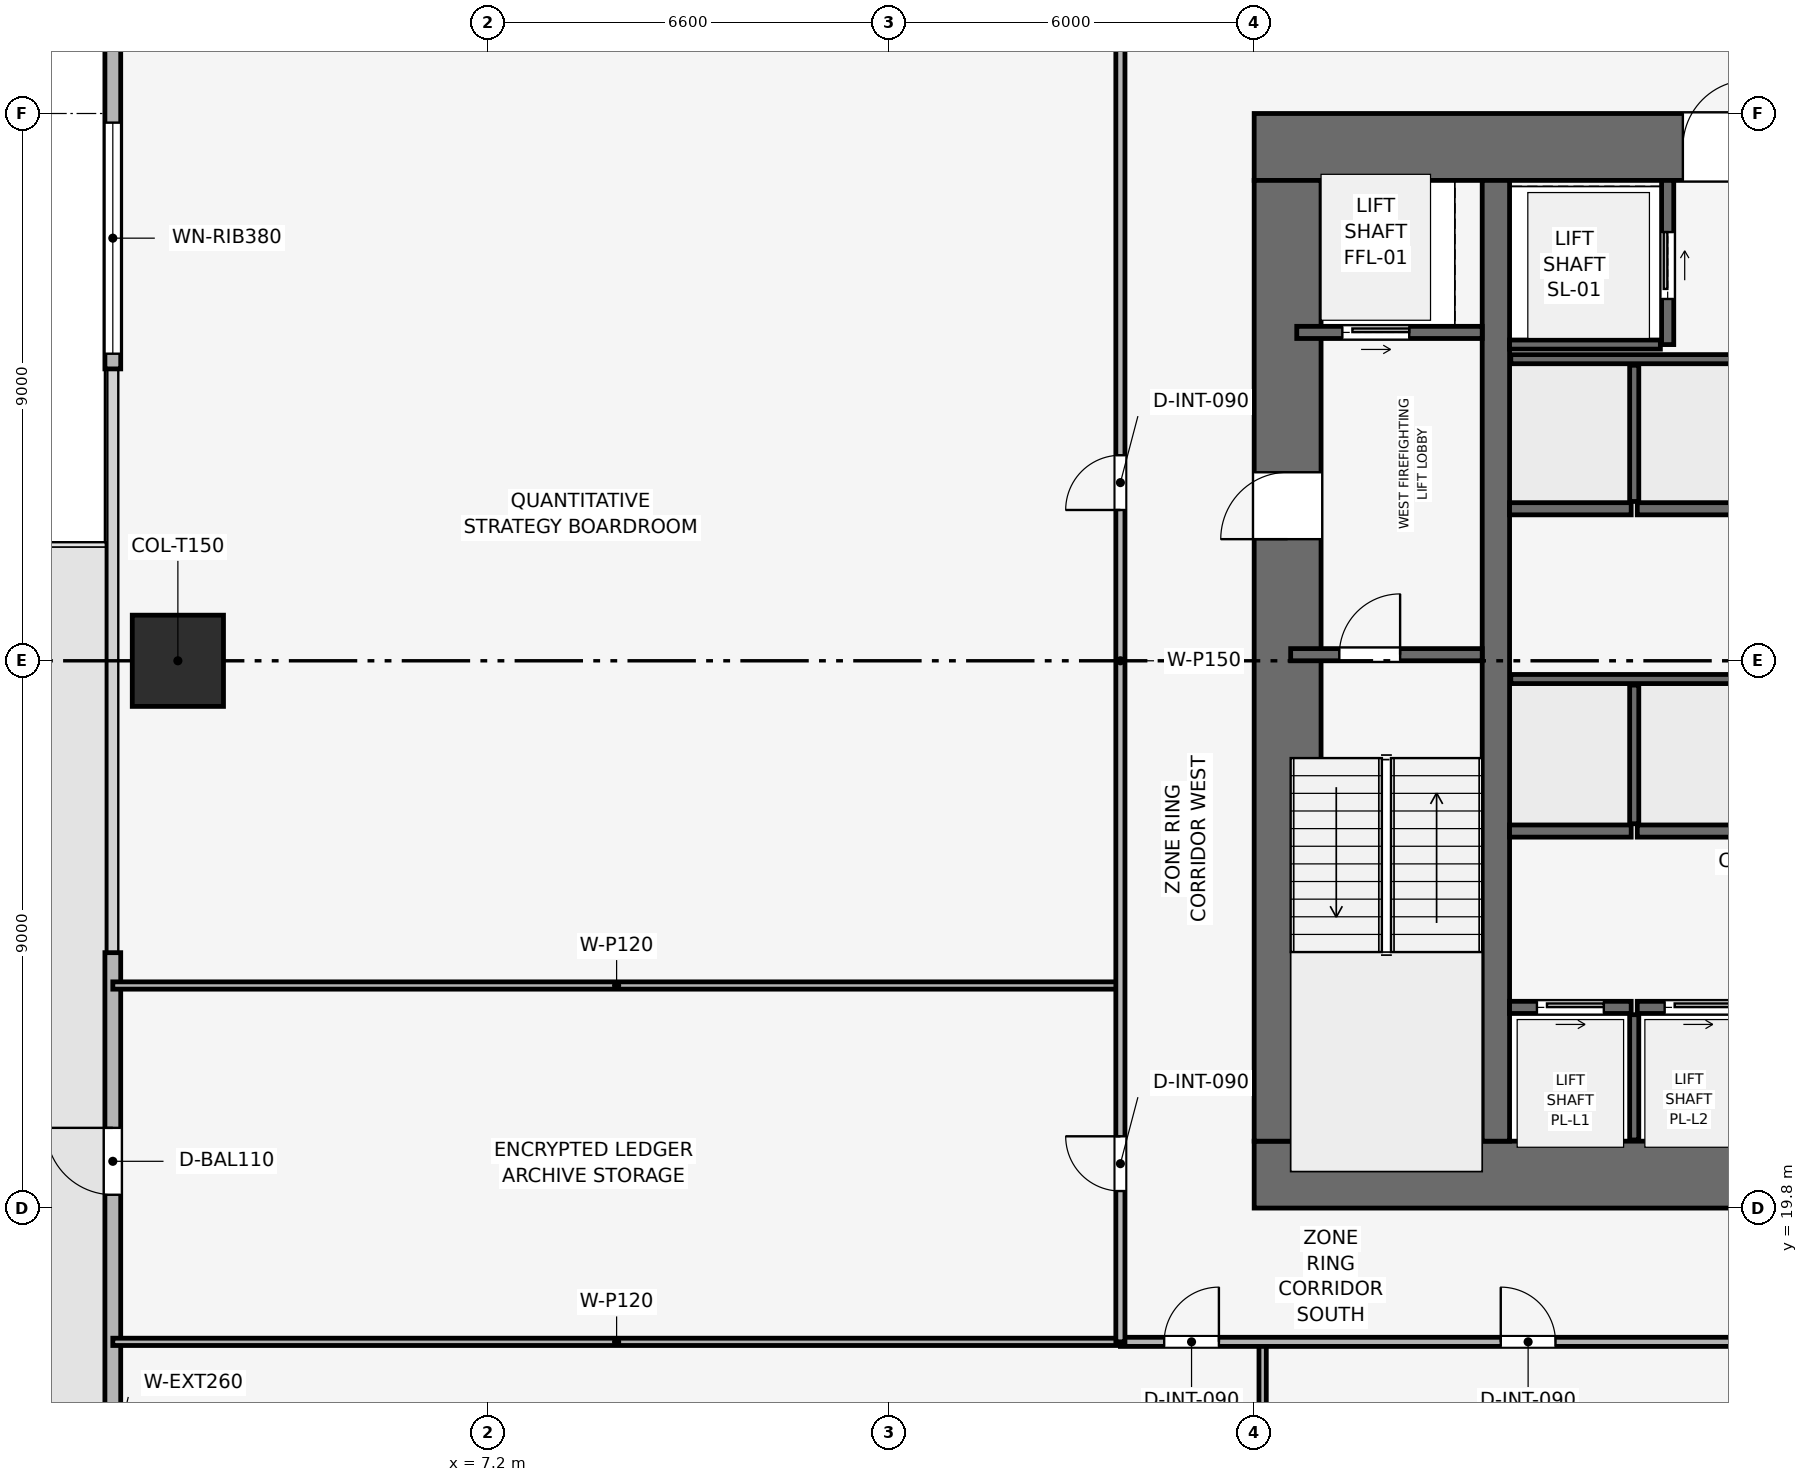
"""IFC4 building model, lengths in metres.
Left out: names, types, materials, properties, quantities, classifications, styles, units other than length and angle.
Written with IfcOpenShell. Run it as: python <this file> out.ifc"""

import sys

from ifc_helpers import new_model, si_unit, direction, frame, frame_2d, origin, origin_2d, place, context, subcontext, project, spatial, rectangle, extrude, element, fill, save


model = new_model("IFC4")
c1 = context("Model", 3, precision=1e-05, world=origin(), true_north=direction((0.0, 1.0)))
c2 = subcontext(c1, "Body", "Model", "MODEL_VIEW")
j1 = project(units=[si_unit("LENGTHUNIT", "METRE"), si_unit("PLANEANGLEUNIT", "RADIAN")], contexts=[c1])
p1 = place(None, origin())
s1 = spatial("IfcSite", under=j1, at=p1, CompositionType="ELEMENT")
p2 = place(p1, origin())
s2 = spatial("IfcBuilding", under=s1, at=p2, CompositionType="ELEMENT")
p3 = place(p2, frame((0.0, 0.0, 61.2)))
s3 = spatial("IfcBuildingStorey", under=s2, at=p3, CompositionType="ELEMENT", Elevation=61.2)
p4 = place(p3, frame((19.8, 20.35, 0.0), z_axis=(0.0, 0.0, 1.0), x_axis=(1.0, 0.0, 0.0)))
e1 = element("IfcWall", 1, at=p4, inside=s3, PredefinedType="SHEAR", context=c2, shape_type="SweptSolid", body=[
    extrude(rectangle(XDim=18.0, YDim=1.1, at=frame_2d((9.0, 0.0))), origin(), (0.0, 0.0, 1.0), 3.9),
])
p5 = place(p4, frame((8.4, 0.0, 0.0)))
e2 = element("IfcOpeningElement", 2, at=p5, cuts=e1, PredefinedType="OPENING", context=c2, shape_type="SweptSolid", body=[
    extrude(rectangle(XDim=1.2, YDim=2.2, at=frame_2d((0.6, 1.1))), frame((0.0, 0.56, 0.0), z_axis=(0.0, -1.0, 0.0), x_axis=(1.0, 0.0, 0.0)), (0.0, 0.0, 1.0), 1.12),
])
p6 = place(p3, frame((19.8, 37.25, 0.0), z_axis=(0.0, 0.0, 1.0), x_axis=(1.0, 0.0, 0.0)))
e3 = element("IfcWall", 3, at=p6, inside=s3, PredefinedType="SHEAR", context=c2, shape_type="SweptSolid", body=[
    extrude(rectangle(XDim=18.0, YDim=1.1, at=frame_2d((9.0, 0.0))), origin(), (0.0, 0.0, 1.0), 3.9),
])
p7 = place(p6, frame((7.05, 0.0, 0.0)))
e4 = element("IfcOpeningElement", 4, at=p7, cuts=e3, PredefinedType="OPENING", context=c2, shape_type="SweptSolid", body=[
    extrude(rectangle(XDim=1.1, YDim=2.15, at=frame_2d((0.55, 1.075))), frame((0.0, 0.56, 0.0), z_axis=(0.0, -1.0, 0.0), x_axis=(1.0, 0.0, 0.0)), (0.0, 0.0, 1.0), 1.12),
])
p8 = place(p3, frame((20.35, 20.9, 0.0), z_axis=(0.0, 0.0, 1.0), x_axis=(0.0, 1.0, 0.0)))
e5 = element("IfcWall", 5, at=p8, inside=s3, PredefinedType="SHEAR", context=c2, shape_type="SweptSolid", body=[
    extrude(rectangle(XDim=15.8, YDim=1.1, at=frame_2d((7.9, 0.0))), origin(), (0.0, 0.0, 1.0), 3.9),
])
p9 = place(p8, frame((9.9, 0.0, 0.0)))
e6 = element("IfcOpeningElement", 6, at=p9, cuts=e5, PredefinedType="OPENING", context=c2, shape_type="SweptSolid", body=[
    extrude(rectangle(XDim=1.1, YDim=2.15, at=frame_2d((0.55, 1.075))), frame((0.0, 0.56, 0.0), z_axis=(0.0, -1.0, 0.0), x_axis=(1.0, 0.0, 0.0)), (0.0, 0.0, 1.0), 1.12),
])
p10 = place(p3, frame((23.775, 20.9, 0.0), z_axis=(0.0, 0.0, 1.0), x_axis=(0.0, 1.0, 0.0)))
e7 = element("IfcWall", 7, at=p10, inside=s3, PredefinedType="SHEAR", context=c2, shape_type="SweptSolid", body=[
    extrude(rectangle(XDim=15.8, YDim=0.45, at=frame_2d((7.9, 0.0))), origin(), (0.0, 0.0, 1.0), 3.9),
])
p11 = place(p3, frame((2.1, 28.8, 0.003), z_axis=(0.0, 0.0, 1.0), x_axis=(1.0, 0.0, 0.0)))
e8 = element("IfcColumn", 8, at=p11, inside=s3, PredefinedType="COLUMN", context=c2, shape_type="SweptSolid", body=[
    extrude(rectangle(XDim=1.5, YDim=1.5, at=origin_2d()), origin(), (0.0, 0.0, 1.0), 3.644),
])
p12 = place(p3, frame((1.03, 8.7, 0.0), z_axis=(0.0, 0.0, 1.0), x_axis=(0.0, 1.0, 0.0)))
e9 = element("IfcWall", 9, at=p12, inside=s3, PredefinedType="SOLIDWALL", context=c2, shape_type="SweptSolid", body=[
    extrude(rectangle(XDim=15.3, YDim=0.26, at=frame_2d((7.65, 0.0))), origin(), (0.0, 0.0, 1.0), 3.65),
])
p13 = place(p12, frame((11.319, 0.0, 0.0)))
e10 = element("IfcOpeningElement", 10, at=p13, cuts=e9, PredefinedType="OPENING", context=c2, shape_type="SweptSolid", body=[
    extrude(rectangle(XDim=1.1, YDim=2.2, at=frame_2d((0.55, 1.1))), frame((0.0, 0.14, 0.0), z_axis=(0.0, -1.0, 0.0), x_axis=(1.0, 0.0, 0.0)), (0.0, 0.0, 1.0), 0.28),
])
p14 = place(p3, frame((1.03, 33.6, 0.0), z_axis=(0.0, 0.0, 1.0), x_axis=(0.0, 1.0, 0.0)))
e11 = element("IfcWall", 11, at=p14, inside=s3, PredefinedType="SOLIDWALL", context=c2, shape_type="SweptSolid", body=[
    extrude(rectangle(XDim=15.3, YDim=0.26, at=frame_2d((7.65, 0.0))), origin(), (0.0, 0.0, 1.0), 3.65),
])
p15 = place(p14, frame((0.25, 0.0, 0.9)))
e12 = element("IfcOpeningElement", 12, at=p15, cuts=e11, PredefinedType="OPENING", context=c2, shape_type="SweptSolid", body=[
    extrude(rectangle(XDim=3.8, YDim=1.9, at=frame_2d((1.9, 0.95))), frame((0.0, 0.14, 0.0), z_axis=(0.0, -1.0, 0.0), x_axis=(1.0, 0.0, 0.0)), (0.0, 0.0, 1.0), 0.28),
])
p16 = place(p3, frame((20.4, 28.9, 0.0), z_axis=(0.0, 0.0, 1.0), x_axis=(1.0, 0.0, 0.0)))
e13 = element("IfcWall", 13, at=p16, inside=s3, PredefinedType="SHEAR", context=c2, shape_type="SweptSolid", body=[
    extrude(rectangle(XDim=3.15, YDim=0.2, at=frame_2d((1.575, 0.0))), origin(), (0.0, 0.0, 1.0), 3.65),
])
p17 = place(p16, frame((0.8, 0.0, 0.0)))
e14 = element("IfcOpeningElement", 14, at=p17, cuts=e13, PredefinedType="OPENING", context=c2, shape_type="SweptSolid", body=[
    extrude(rectangle(XDim=1.0, YDim=2.1, at=frame_2d((0.5, 1.05))), frame((0.0, 0.11, 0.0), z_axis=(0.0, -1.0, 0.0), x_axis=(1.0, 0.0, 0.0)), (0.0, 0.0, 1.0), 0.22),
])
p18 = place(p3, frame((20.5, 34.2, 0.0), z_axis=(0.0, 0.0, 1.0), x_axis=(1.0, 0.0, 0.0)))
e15 = element("IfcWall", 15, at=p18, inside=s3, PredefinedType="SHEAR", context=c2, shape_type="SweptSolid", body=[
    extrude(rectangle(XDim=3.05, YDim=0.2, at=frame_2d((1.525, 0.0))), origin(), (0.0, 0.0, 1.0), 3.65),
])
p19 = place(p18, frame((0.75, 0.0, 0.0)))
e16 = element("IfcOpeningElement", 16, at=p19, cuts=e15, PredefinedType="OPENING", context=c2, shape_type="SweptSolid", body=[
    extrude(rectangle(XDim=1.1, YDim=2.15, at=frame_2d((0.55, 1.075))), frame((0.0, 0.11, 0.0), z_axis=(0.0, -1.0, 0.0), x_axis=(1.0, 0.0, 0.0)), (0.0, 0.0, 1.0), 0.22),
])
p20 = place(p3, frame((26.6, 34.0, 0.0), z_axis=(0.0, 0.0, 1.0), x_axis=(0.0, 1.0, 0.0)))
e17 = element("IfcWall", 17, at=p20, inside=s3, PredefinedType="SHEAR", context=c2, shape_type="SweptSolid", body=[
    extrude(rectangle(XDim=2.7, YDim=0.2, at=frame_2d((1.35, 0.0))), origin(), (0.0, 0.0, 1.0), 3.65),
])
p21 = place(p20, frame((0.75, 0.0, 0.0)))
e18 = element("IfcOpeningElement", 18, at=p21, cuts=e17, PredefinedType="OPENING", context=c2, shape_type="SweptSolid", body=[
    extrude(rectangle(XDim=1.1, YDim=2.15, at=frame_2d((0.55, 1.075))), frame((0.0, 0.11, 0.0), z_axis=(0.0, -1.0, 0.0), x_axis=(1.0, 0.0, 0.0)), (0.0, 0.0, 1.0), 0.22),
])
p22 = place(p3, frame((24.0, 34.0, 0.0), z_axis=(0.0, 0.0, 1.0), x_axis=(1.0, 0.0, 0.0)))
e19 = element("IfcWall", 19, at=p22, inside=s3, PredefinedType="SHEAR", context=c2, shape_type="SweptSolid", body=[
    extrude(rectangle(XDim=2.48, YDim=0.15, at=frame_2d((1.24, 0.0))), origin(), (0.0, 0.0, 1.0), 3.65),
])
p23 = place(p3, frame((24.0, 23.1, 0.0), z_axis=(0.0, 0.0, 1.0), x_axis=(1.0, 0.0, 0.0)))
e20 = element("IfcWall", 20, at=p23, inside=s3, PredefinedType="SHEAR", context=c2, shape_type="SweptSolid", body=[
    extrude(rectangle(XDim=2.0, YDim=0.2, at=frame_2d((1.0, 0.0))), origin(), (0.0, 0.0, 1.0), 3.65),
])
p24 = place(p23, frame((0.45, 0.0, 0.0)))
e21 = element("IfcOpeningElement", 21, at=p24, cuts=e20, PredefinedType="OPENING", context=c2, shape_type="SweptSolid", body=[
    extrude(rectangle(XDim=1.1, YDim=2.15, at=frame_2d((0.55, 1.075))), frame((0.0, 0.11, 0.0), z_axis=(0.0, -1.0, 0.0), x_axis=(1.0, 0.0, 0.0)), (0.0, 0.0, 1.0), 0.22),
])
p25 = place(p3, frame((26.1, 23.1, 0.0), z_axis=(0.0, 0.0, 1.0), x_axis=(1.0, 0.0, 0.0)))
e22 = element("IfcWall", 22, at=p25, inside=s3, PredefinedType="SHEAR", context=c2, shape_type="SweptSolid", body=[
    extrude(rectangle(XDim=2.0, YDim=0.2, at=frame_2d((1.0, 0.0))), origin(), (0.0, 0.0, 1.0), 3.65),
])
p26 = place(p25, frame((0.45, 0.0, 0.0)))
e23 = element("IfcOpeningElement", 23, at=p26, cuts=e22, PredefinedType="OPENING", context=c2, shape_type="SweptSolid", body=[
    extrude(rectangle(XDim=1.1, YDim=2.15, at=frame_2d((0.55, 1.075))), frame((0.0, 0.11, 0.0), z_axis=(0.0, -1.0, 0.0), x_axis=(1.0, 0.0, 0.0)), (0.0, 0.0, 1.0), 0.22),
])
for number, where, z_axis, x_axis in (
    (24, (24.0, 26.0, 0.0), (0.0, 0.0, 1.0), (1.0, 0.0, 0.0)),
    (25, (26.1, 26.0, 0.0), (0.0, 0.0, 1.0), (1.0, 0.0, 0.0)),
    (26, (24.0, 31.3, 0.0), (0.0, 0.0, 1.0), (1.0, 0.0, 0.0)),
    (27, (26.1, 31.3, 0.0), (0.0, 0.0, 1.0), (1.0, 0.0, 0.0)),
):
    element("IfcWall", number, at=place(p3, frame(where, z_axis=z_axis, x_axis=x_axis)), inside=s3, PredefinedType="SHEAR", context=c2, shape_type="SweptSolid", body=[
        extrude(rectangle(XDim=2.0, YDim=0.2, at=frame_2d((1.0, 0.0))), origin(), (0.0, 0.0, 1.0), 3.65),
    ])
p27 = place(p3, frame((26.05, 20.92, 0.0), z_axis=(0.0, 0.0, 1.0), x_axis=(0.0, 1.0, 0.0)))
e28 = element("IfcWall", 28, at=p27, inside=s3, PredefinedType="SHEAR", context=c2, shape_type="SweptSolid", body=[
    extrude(rectangle(XDim=2.06, YDim=0.15, at=frame_2d((1.03, 0.0))), origin(), (0.0, 0.0, 1.0), 3.65),
])
p28 = place(p3, frame((24.02, 28.5, 0.0), z_axis=(0.0, 0.0, 1.0), x_axis=(1.0, 0.0, 0.0)))
e29 = element("IfcWall", 29, at=p28, inside=s3, PredefinedType="SHEAR", context=c2, shape_type="SweptSolid", body=[
    extrude(rectangle(XDim=4.08, YDim=0.15, at=frame_2d((2.04, 0.0))), origin(), (0.0, 0.0, 1.0), 3.65),
])
p29 = place(p3, frame((26.05, 26.12, 0.0), z_axis=(0.0, 0.0, 1.0), x_axis=(0.0, 1.0, 0.0)))
e30 = element("IfcWall", 30, at=p29, inside=s3, PredefinedType="SHEAR", context=c2, shape_type="SweptSolid", body=[
    extrude(rectangle(XDim=2.28, YDim=0.15, at=frame_2d((1.14, 0.0))), origin(), (0.0, 0.0, 1.0), 3.65),
])
p30 = place(p3, frame((24.02, 33.76, 0.0), z_axis=(0.0, 0.0, 1.0), x_axis=(1.0, 0.0, 0.0)))
e31 = element("IfcWall", 31, at=p30, inside=s3, PredefinedType="SHEAR", context=c2, shape_type="SweptSolid", body=[
    extrude(rectangle(XDim=4.08, YDim=0.15, at=frame_2d((2.04, 0.0))), origin(), (0.0, 0.0, 1.0), 3.65),
])
p31 = place(p3, frame((26.05, 31.42, 0.0), z_axis=(0.0, 0.0, 1.0), x_axis=(0.0, 1.0, 0.0)))
e32 = element("IfcWall", 32, at=p31, inside=s3, PredefinedType="SHEAR", context=c2, shape_type="SweptSolid", body=[
    extrude(rectangle(XDim=2.24, YDim=0.15, at=frame_2d((1.12, 0.0))), origin(), (0.0, 0.0, 1.0), 3.65),
])
for number, where, z_axis, x_axis in (
    (33, (19.939, 1.03, 0.0), (0.0, 0.0, 1.0), (0.0, 1.0, 0.0)),
    (34, (1.03, 17.6, 0.0), (0.0, 0.0, 1.0), (1.0, 0.0, 0.0)),
    (35, (1.03, 23.46, 0.0), (0.0, 0.0, 1.0), (1.0, 0.0, 0.0)),
):
    element("IfcWall", number, at=place(p3, frame(where, z_axis=z_axis, x_axis=x_axis)), inside=s3, PredefinedType="PARTITIONING", context=c2, shape_type="SweptSolid", body=[
        extrude(rectangle(XDim=16.57, YDim=0.12, at=frame_2d((8.285, 0.0))), origin(), (0.0, 0.0, 1.0), 2.935),
    ])
p32 = place(p3, frame((17.6, 17.6, 0.0), z_axis=(0.0, 0.0, 1.0), x_axis=(1.0, 0.0, 0.0)))
e36 = element("IfcWall", 36, at=p32, inside=s3, PredefinedType="PARTITIONING", context=c2, shape_type="SweptSolid", body=[
    extrude(rectangle(XDim=22.4, YDim=0.15, at=frame_2d((11.2, 0.0))), origin(), (0.0, 0.0, 1.0), 3.085),
])
p33 = place(p32, frame((0.72, 0.0, 0.0)))
e37 = element("IfcOpeningElement", 37, at=p33, cuts=e36, PredefinedType="OPENING", context=c2, shape_type="SweptSolid", body=[
    extrude(rectangle(XDim=0.9, YDim=2.1, at=frame_2d((0.45, 1.05))), frame((0.0, 0.085, 0.0), z_axis=(0.0, -1.0, 0.0), x_axis=(1.0, 0.0, 0.0)), (0.0, 0.0, 1.0), 0.17),
])
p34 = place(p32, frame((6.255, 0.0, 0.0)))
e38 = element("IfcOpeningElement", 38, at=p34, cuts=e36, PredefinedType="OPENING", context=c2, shape_type="SweptSolid", body=[
    extrude(rectangle(XDim=0.9, YDim=2.1, at=frame_2d((0.45, 1.05))), frame((0.0, 0.085, 0.0), z_axis=(0.0, -1.0, 0.0), x_axis=(1.0, 0.0, 0.0)), (0.0, 0.0, 1.0), 0.17),
])
p35 = place(p32, frame((16.285, 0.0, 0.0)))
e39 = element("IfcOpeningElement", 39, at=p35, cuts=e36, PredefinedType="OPENING", context=c2, shape_type="SweptSolid", body=[
    extrude(rectangle(XDim=0.9, YDim=2.1, at=frame_2d((0.45, 1.05))), frame((0.0, 0.085, 0.0), z_axis=(0.0, -1.0, 0.0), x_axis=(1.0, 0.0, 0.0)), (0.0, 0.0, 1.0), 0.17),
])
p36 = place(p3, frame((17.6, 17.6, 0.0), z_axis=(0.0, 0.0, 1.0), x_axis=(0.0, 1.0, 0.0)))
e40 = element("IfcWall", 40, at=p36, inside=s3, PredefinedType="PARTITIONING", context=c2, shape_type="SweptSolid", body=[
    extrude(rectangle(XDim=22.4, YDim=0.15, at=frame_2d((11.2, 0.0))), origin(), (0.0, 0.0, 1.0), 3.085),
])
p37 = place(p36, frame((2.48, 0.0, 0.0)))
e41 = element("IfcOpeningElement", 41, at=p37, cuts=e40, PredefinedType="OPENING", context=c2, shape_type="SweptSolid", body=[
    extrude(rectangle(XDim=0.9, YDim=2.1, at=frame_2d((0.45, 1.05))), frame((0.0, 0.085, 0.0), z_axis=(0.0, -1.0, 0.0), x_axis=(1.0, 0.0, 0.0)), (0.0, 0.0, 1.0), 0.17),
])
p38 = place(p36, frame((13.68, 0.0, 0.0)))
e42 = element("IfcOpeningElement", 42, at=p38, cuts=e40, PredefinedType="OPENING", context=c2, shape_type="SweptSolid", body=[
    extrude(rectangle(XDim=0.9, YDim=2.1, at=frame_2d((0.45, 1.05))), frame((0.0, 0.085, 0.0), z_axis=(0.0, -1.0, 0.0), x_axis=(1.0, 0.0, 0.0)), (0.0, 0.0, 1.0), 0.17),
])
p39 = place(p13, origin())
e43 = element("IfcDoor", 43, at=p39, inside=s3, OperationType="SINGLE_SWING_RIGHT", PredefinedType="DOOR", context=c2, shape_type="SweptSolid", body=[
    extrude(rectangle(XDim=1.1, YDim=2.2, at=frame_2d((0.55, 1.1))), frame((0.0, 0.025, 0.0), z_axis=(0.0, -1.0, 0.0), x_axis=(1.0, 0.0, 0.0)), (0.0, 0.0, 1.0), 0.05),
])
fill(e10, e43)
p40 = place(p15, origin())
e44 = element("IfcWindow", 44, at=p40, inside=s3, PartitioningType="SINGLE_PANEL", PredefinedType="WINDOW", context=c2, shape_type="SweptSolid", body=[
    extrude(rectangle(XDim=3.8, YDim=1.9, at=frame_2d((1.9, 0.95))), frame((0.0, 0.03, 0.0), z_axis=(0.0, -1.0, 0.0), x_axis=(1.0, 0.0, 0.0)), (0.0, 0.0, 1.0), 0.06),
])
fill(e12, e44)
p41 = place(p17, origin())
e45 = element("IfcDoor", 45, at=p41, inside=s3, OperationType="SINGLE_SWING_RIGHT", PredefinedType="DOOR", context=c2, shape_type="SweptSolid", body=[
    extrude(rectangle(XDim=1.0, YDim=2.1, at=frame_2d((0.5, 1.05))), frame((0.0, 0.025, 0.0), z_axis=(0.0, -1.0, 0.0), x_axis=(1.0, 0.0, 0.0)), (0.0, 0.0, 1.0), 0.05),
])
fill(e14, e45)
p42 = place(p19, origin())
e46 = element("IfcDoor", 46, at=p42, inside=s3, OperationType="SLIDING_TO_RIGHT", PredefinedType="DOOR", context=c2, shape_type="SweptSolid", body=[
    extrude(rectangle(XDim=1.1, YDim=2.15, at=frame_2d((0.55, 1.075))), frame((0.0, 0.025, 0.0), z_axis=(0.0, -1.0, 0.0), x_axis=(1.0, 0.0, 0.0)), (0.0, 0.0, 1.0), 0.05),
])
fill(e16, e46)
p43 = place(p21, origin())
e47 = element("IfcDoor", 47, at=p43, inside=s3, OperationType="SLIDING_TO_RIGHT", PredefinedType="DOOR", context=c2, shape_type="SweptSolid", body=[
    extrude(rectangle(XDim=1.1, YDim=2.15, at=frame_2d((0.55, 1.075))), frame((0.0, 0.025, 0.0), z_axis=(0.0, -1.0, 0.0), x_axis=(1.0, 0.0, 0.0)), (0.0, 0.0, 1.0), 0.05),
])
fill(e18, e47)
p44 = place(p24, origin())
e48 = element("IfcDoor", 48, at=p44, inside=s3, OperationType="SLIDING_TO_RIGHT", PredefinedType="DOOR", context=c2, shape_type="SweptSolid", body=[
    extrude(rectangle(XDim=1.1, YDim=2.15, at=frame_2d((0.55, 1.075))), frame((0.0, 0.025, 0.0), z_axis=(0.0, -1.0, 0.0), x_axis=(1.0, 0.0, 0.0)), (0.0, 0.0, 1.0), 0.05),
])
fill(e21, e48)
p45 = place(p26, origin())
e49 = element("IfcDoor", 49, at=p45, inside=s3, OperationType="SLIDING_TO_RIGHT", PredefinedType="DOOR", context=c2, shape_type="SweptSolid", body=[
    extrude(rectangle(XDim=1.1, YDim=2.15, at=frame_2d((0.55, 1.075))), frame((0.0, 0.025, 0.0), z_axis=(0.0, -1.0, 0.0), x_axis=(1.0, 0.0, 0.0)), (0.0, 0.0, 1.0), 0.05),
])
fill(e23, e49)
p46 = place(p33, origin())
e50 = element("IfcDoor", 50, at=p46, inside=s3, OperationType="SINGLE_SWING_RIGHT", PredefinedType="DOOR", context=c2, shape_type="SweptSolid", body=[
    extrude(rectangle(XDim=0.9, YDim=2.1, at=frame_2d((0.45, 1.05))), frame((0.0, 0.025, 0.0), z_axis=(0.0, -1.0, 0.0), x_axis=(1.0, 0.0, 0.0)), (0.0, 0.0, 1.0), 0.05),
])
fill(e37, e50)
p47 = place(p34, origin())
e51 = element("IfcDoor", 51, at=p47, inside=s3, OperationType="SINGLE_SWING_LEFT", PredefinedType="DOOR", context=c2, shape_type="SweptSolid", body=[
    extrude(rectangle(XDim=0.9, YDim=2.1, at=frame_2d((0.45, 1.05))), frame((0.0, 0.025, 0.0), z_axis=(0.0, -1.0, 0.0), x_axis=(1.0, 0.0, 0.0)), (0.0, 0.0, 1.0), 0.05),
])
fill(e38, e51)
p48 = place(p37, origin())
e52 = element("IfcDoor", 52, at=p48, inside=s3, OperationType="SINGLE_SWING_RIGHT", PredefinedType="DOOR", context=c2, shape_type="SweptSolid", body=[
    extrude(rectangle(XDim=0.9, YDim=2.1, at=frame_2d((0.45, 1.05))), frame((0.0, 0.025, 0.0), z_axis=(0.0, -1.0, 0.0), x_axis=(1.0, 0.0, 0.0)), (0.0, 0.0, 1.0), 0.05),
])
fill(e41, e52)
p49 = place(p38, origin())
e53 = element("IfcDoor", 53, at=p49, inside=s3, OperationType="SINGLE_SWING_LEFT", PredefinedType="DOOR", context=c2, shape_type="SweptSolid", body=[
    extrude(rectangle(XDim=0.9, YDim=2.1, at=frame_2d((0.45, 1.05))), frame((0.0, 0.025, 0.0), z_axis=(0.0, -1.0, 0.0), x_axis=(1.0, 0.0, 0.0)), (0.0, 0.0, 1.0), 0.05),
])
fill(e42, e53)
p50 = place(p9, origin())
e54 = element("IfcDoor", 54, at=p50, inside=s3, OperationType="SINGLE_SWING_LEFT", PredefinedType="DOOR", context=c2, shape_type="SweptSolid", body=[
    extrude(rectangle(XDim=1.1, YDim=2.15, at=frame_2d((0.55, 1.075))), frame((0.0, 0.025, 0.0), z_axis=(0.0, -1.0, 0.0), x_axis=(1.0, 0.0, 0.0)), (0.0, 0.0, 1.0), 0.05),
])
fill(e6, e54)
p51 = place(p7, origin())
e55 = element("IfcDoor", 55, at=p51, inside=s3, OperationType="SINGLE_SWING_RIGHT", PredefinedType="DOOR", context=c2, shape_type="SweptSolid", body=[
    extrude(rectangle(XDim=1.1, YDim=2.15, at=frame_2d((0.55, 1.075))), frame((0.0, 0.025, 0.0), z_axis=(0.0, -1.0, 0.0), x_axis=(1.0, 0.0, 0.0)), (0.0, 0.0, 1.0), 0.05),
])
fill(e4, e55)
save(model, sys.argv[1])
